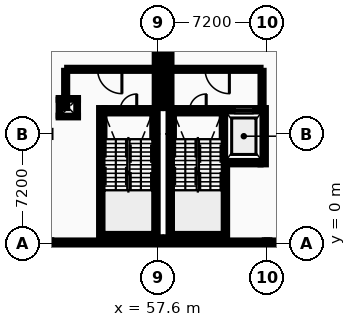
"""IFC4 building model, lengths in metres.
Left out: names, types, materials, properties, quantities, classifications, styles, units other than length and angle.
Written with IfcOpenShell. Run it as: python <this file> out.ifc"""

import sys

from ifc_helpers import new_model, si_unit, direction, frame, frame_2d, origin, origin_2d, place, context, subcontext, project, spatial, rectangle, i_section, extrude, element, fill, save


model = new_model("IFC4")
c1 = context("Model", 3, precision=1e-05, world=origin(), true_north=direction((0.0, 1.0)))
c2 = subcontext(c1, "Body", "Model", "MODEL_VIEW")
j1 = project(units=[si_unit("LENGTHUNIT", "METRE"), si_unit("PLANEANGLEUNIT", "RADIAN")], contexts=[c1])
p1 = place(None, origin())
s1 = spatial("IfcSite", under=j1, at=p1, CompositionType="ELEMENT")
p2 = place(p1, origin())
s2 = spatial("IfcBuilding", under=s1, at=p2, CompositionType="ELEMENT")
p3 = place(p2, frame((0.0, 0.0, 5.2)))
s3 = spatial("IfcBuildingStorey", under=s2, at=p3, CompositionType="ELEMENT", Elevation=5.2)
for number, where, z_axis, x_axis in (
    (1, (57.6, 0.0, 0.0), (0.0, 0.0, 1.0), (1.0, 0.0, 0.0)),
    (2, (58.32, 0.0, 0.0), (0.0, 0.0, 1.0), (1.0, 0.0, 0.0)),
    (3, (64.8, 0.0, 0.0), (0.0, 0.0, 1.0), (1.0, 0.0, 0.0)),
):
    element("IfcColumn", number, at=place(p3, frame(where, z_axis=z_axis, x_axis=x_axis)), inside=s3, PredefinedType="COLUMN", context=c2, shape_type="SweptSolid", body=[
        extrude(i_section(OverallWidth=0.3, OverallDepth=0.4, WebThickness=0.013, FlangeThickness=0.024, FilletRadius=0.027, at=origin_2d()), origin(), (0.0, 0.0, 1.0), 4.4),
    ])
p4 = place(p3, frame((50.29, 0.0, 0.0), z_axis=(0.0, 0.0, 1.0), x_axis=(1.0, 0.0, 0.0)))
e4 = element("IfcWall", 4, at=p4, inside=s3, PredefinedType="STANDARD", context=c2, shape_type="SweptSolid", body=[
    extrude(rectangle(XDim=7.12, YDim=0.38, at=frame_2d((3.56, 0.0))), origin(), (0.0, 0.0, 1.0), 3.88),
])
p5 = place(p4, frame((4.554, 0.0, 0.95)))
e5 = element("IfcOpeningElement", 5, at=p5, cuts=e4, PredefinedType="OPENING", context=c2, shape_type="SweptSolid", body=[
    extrude(rectangle(XDim=0.86, YDim=1.332, at=frame_2d((0.43, 0.666))), frame((0.0, 0.2, 0.0), z_axis=(0.0, -1.0, 0.0), x_axis=(1.0, 0.0, 0.0)), (0.0, 0.0, 1.0), 0.4),
])
p6 = place(p3, frame((57.6, -0.19, 0.0), z_axis=(0.0, 0.0, 1.0), x_axis=(0.0, 1.0, 0.0)))
e6 = element("IfcWall", 6, at=p6, inside=s3, PredefinedType="STANDARD", context=c2, shape_type="SweptSolid", body=[
    extrude(rectangle(XDim=0.59, YDim=0.38, at=frame_2d((0.295, 0.0))), origin(), (0.0, 0.0, 1.0), 4.185),
])
p7 = place(p3, frame((57.6, 8.9, 0.0), z_axis=(0.0, 0.0, 1.0), x_axis=(0.0, 1.0, 0.0)))
e7 = element("IfcWall", 7, at=p7, inside=s3, PredefinedType="STANDARD", context=c2, shape_type="SweptSolid", body=[
    extrude(rectangle(XDim=5.5, YDim=0.38, at=frame_2d((2.75, 0.0))), origin(), (0.0, 0.0, 1.0), 4.185),
])
p8 = place(p3, frame((58.51, 0.0, 0.0), z_axis=(0.0, 0.0, 1.0), x_axis=(1.0, 0.0, 0.0)))
e8 = element("IfcWall", 8, at=p8, inside=s3, PredefinedType="STANDARD", context=c2, shape_type="SweptSolid", body=[
    extrude(rectangle(XDim=6.29, YDim=0.38, at=frame_2d((3.145, 0.0))), origin(), (0.0, 0.0, 1.0), 3.88),
])
p9 = place(p3, frame((64.8, 0.0, 0.0), z_axis=(0.0, 0.0, 1.0), x_axis=(1.0, 0.0, 0.0)))
e9 = element("IfcWall", 9, at=p9, inside=s3, PredefinedType="STANDARD", context=c2, shape_type="SweptSolid", body=[
    extrude(rectangle(XDim=7.2, YDim=0.38, at=frame_2d((3.6, 0.0))), origin(), (0.0, 0.0, 1.0), 3.88),
])
p10 = place(p9, frame((1.611, 0.0, 0.95)))
e10 = element("IfcOpeningElement", 10, at=p10, cuts=e9, PredefinedType="OPENING", context=c2, shape_type="SweptSolid", body=[
    extrude(rectangle(XDim=1.098, YDim=1.26, at=frame_2d((0.549, 0.63))), frame((0.0, 0.2, 0.0), z_axis=(0.0, -1.0, 0.0), x_axis=(1.0, 0.0, 0.0)), (0.0, 0.0, 1.0), 0.4),
])
p11 = place(p9, frame((4.491, 0.0, 0.95)))
e11 = element("IfcOpeningElement", 11, at=p11, cuts=e9, PredefinedType="OPENING", context=c2, shape_type="SweptSolid", body=[
    extrude(rectangle(XDim=1.098, YDim=1.26, at=frame_2d((0.549, 0.63))), frame((0.0, 0.2, 0.0), z_axis=(0.0, -1.0, 0.0), x_axis=(1.0, 0.0, 0.0)), (0.0, 0.0, 1.0), 0.4),
])
p12 = place(p3, frame((58.32, 0.4, 0.0), z_axis=(0.0, 0.0, 1.0), x_axis=(0.0, -1.0, 0.0)))
e12 = element("IfcWall", 12, at=p12, inside=s3, PredefinedType="STANDARD", context=c2, shape_type="SweptSolid", body=[
    extrude(rectangle(XDim=0.59, YDim=0.38, at=frame_2d((0.295, 0.0))), origin(), (0.0, 0.0, 1.0), 4.185),
])
p13 = place(p3, frame((58.32, 14.4, 0.0), z_axis=(0.0, 0.0, 1.0), x_axis=(0.0, -1.0, 0.0)))
e13 = element("IfcWall", 13, at=p13, inside=s3, PredefinedType="STANDARD", context=c2, shape_type="SweptSolid", body=[
    extrude(rectangle(XDim=5.5, YDim=0.38, at=frame_2d((2.75, 0.0))), origin(), (0.0, 0.0, 1.0), 4.185),
])
p14 = place(p3, frame((54.1, 0.575, 0.0), z_axis=(0.0, 0.0, 1.0), x_axis=(1.0, 0.0, 0.0)))
e14 = element("IfcWall", 14, at=p14, inside=s3, PredefinedType="SHEAR", context=c2, shape_type="SweptSolid", body=[
    extrude(rectangle(XDim=3.15, YDim=0.35, at=frame_2d((1.575, 0.0))), origin(), (0.0, 0.0, 1.0), 4.185),
])
p15 = place(p3, frame((54.1, 8.725, 0.0), z_axis=(0.0, 0.0, 1.0), x_axis=(1.0, 0.0, 0.0)))
e15 = element("IfcWall", 15, at=p15, inside=s3, PredefinedType="SHEAR", context=c2, shape_type="SweptSolid", body=[
    extrude(rectangle(XDim=3.15, YDim=0.35, at=frame_2d((1.575, 0.0))), origin(), (0.0, 0.0, 1.0), 4.185),
])
p16 = place(p15, frame((1.025, 0.0, 0.0)))
e16 = element("IfcOpeningElement", 16, at=p16, cuts=e15, PredefinedType="OPENING", context=c2, shape_type="SweptSolid", body=[
    extrude(rectangle(XDim=1.1, YDim=2.15, at=frame_2d((0.55, 1.075))), frame((0.0, 0.185, 0.0), z_axis=(0.0, -1.0, 0.0), x_axis=(1.0, 0.0, 0.0)), (0.0, 0.0, 1.0), 0.37),
])
for number, where, z_axis, x_axis in (
    (17, (53.925, 0.4, 0.0), (0.0, 0.0, 1.0), (0.0, 1.0, 0.0)),
    (18, (57.425, 0.4, 0.0), (0.0, 0.0, 1.0), (0.0, 1.0, 0.0)),
):
    element("IfcWall", number, at=place(p3, frame(where, z_axis=z_axis, x_axis=x_axis)), inside=s3, PredefinedType="SHEAR", context=c2, shape_type="SweptSolid", body=[
        extrude(rectangle(XDim=8.5, YDim=0.35, at=frame_2d((4.25, 0.0))), origin(), (0.0, 0.0, 1.0), 4.185),
    ])
p17 = place(p3, frame((51.65, 11.45, 0.0), z_axis=(0.0, 0.0, 1.0), x_axis=(1.0, 0.0, 0.0)))
e19 = element("IfcWall", 19, at=p17, inside=s3, PredefinedType="PARTITIONING", context=c2, shape_type="SweptSolid", body=[
    extrude(rectangle(XDim=5.6, YDim=0.2, at=frame_2d((2.8, 0.0))), origin(), (0.0, 0.0, 1.0), 4.185),
])
p18 = place(p17, frame((2.0, 0.0, 0.0)))
e20 = element("IfcOpeningElement", 20, at=p18, cuts=e19, PredefinedType="OPENING", context=c2, shape_type="SweptSolid", body=[
    extrude(rectangle(XDim=1.6, YDim=2.2, at=frame_2d((0.8, 1.1))), frame((0.0, 0.11, 0.0), z_axis=(0.0, -1.0, 0.0), x_axis=(1.0, 0.0, 0.0)), (0.0, 0.0, 1.0), 0.22),
])
p19 = place(p3, frame((51.55, 8.9, 0.0), z_axis=(0.0, 0.0, 1.0), x_axis=(0.0, 1.0, 0.0)))
e21 = element("IfcWall", 21, at=p19, inside=s3, PredefinedType="PARTITIONING", context=c2, shape_type="SweptSolid", body=[
    extrude(rectangle(XDim=2.45, YDim=0.2, at=frame_2d((1.225, 0.0))), origin(), (0.0, 0.0, 1.0), 4.185),
])
p20 = place(p3, frame((58.67, 0.575, 0.0), z_axis=(0.0, 0.0, 1.0), x_axis=(1.0, 0.0, 0.0)))
e22 = element("IfcWall", 22, at=p20, inside=s3, PredefinedType="SHEAR", context=c2, shape_type="SweptSolid", body=[
    extrude(rectangle(XDim=3.15, YDim=0.35, at=frame_2d((1.575, 0.0))), origin(), (0.0, 0.0, 1.0), 4.185),
])
p21 = place(p3, frame((58.67, 8.725, 0.0), z_axis=(0.0, 0.0, 1.0), x_axis=(1.0, 0.0, 0.0)))
e23 = element("IfcWall", 23, at=p21, inside=s3, PredefinedType="SHEAR", context=c2, shape_type="SweptSolid", body=[
    extrude(rectangle(XDim=3.15, YDim=0.35, at=frame_2d((1.575, 0.0))), origin(), (0.0, 0.0, 1.0), 4.185),
])
p22 = place(p21, frame((1.025, 0.0, 0.0)))
e24 = element("IfcOpeningElement", 24, at=p22, cuts=e23, PredefinedType="OPENING", context=c2, shape_type="SweptSolid", body=[
    extrude(rectangle(XDim=1.1, YDim=2.15, at=frame_2d((0.55, 1.075))), frame((0.0, 0.185, 0.0), z_axis=(0.0, -1.0, 0.0), x_axis=(1.0, 0.0, 0.0)), (0.0, 0.0, 1.0), 0.37),
])
for number, where, z_axis, x_axis in (
    (25, (58.495, 0.4, 0.0), (0.0, 0.0, 1.0), (0.0, 1.0, 0.0)),
    (26, (61.995, 0.4, 0.0), (0.0, 0.0, 1.0), (0.0, 1.0, 0.0)),
):
    element("IfcWall", number, at=place(p3, frame(where, z_axis=z_axis, x_axis=x_axis)), inside=s3, PredefinedType="SHEAR", context=c2, shape_type="SweptSolid", body=[
        extrude(rectangle(XDim=8.5, YDim=0.35, at=frame_2d((4.25, 0.0))), origin(), (0.0, 0.0, 1.0), 4.185),
    ])
p23 = place(p3, frame((62.17, 5.375, 0.0), z_axis=(0.0, 0.0, 1.0), x_axis=(1.0, 0.0, 0.0)))
e27 = element("IfcWall", 27, at=p23, inside=s3, PredefinedType="SHEAR", context=c2, shape_type="SweptSolid", body=[
    extrude(rectangle(XDim=2.2, YDim=0.35, at=frame_2d((1.1, 0.0))), origin(), (0.0, 0.0, 1.0), 4.185),
])
p24 = place(p3, frame((62.17, 8.725, 0.0), z_axis=(0.0, 0.0, 1.0), x_axis=(1.0, 0.0, 0.0)))
e28 = element("IfcWall", 28, at=p24, inside=s3, PredefinedType="SHEAR", context=c2, shape_type="SweptSolid", body=[
    extrude(rectangle(XDim=2.2, YDim=0.35, at=frame_2d((1.1, 0.0))), origin(), (0.0, 0.0, 1.0), 4.185),
])
p25 = place(p24, frame((0.5, 0.0, 0.0)))
e29 = element("IfcOpeningElement", 29, at=p25, cuts=e28, PredefinedType="OPENING", context=c2, shape_type="SweptSolid", body=[
    extrude(rectangle(XDim=1.2, YDim=2.2, at=frame_2d((0.6, 1.1))), frame((0.0, 0.185, 0.0), z_axis=(0.0, -1.0, 0.0), x_axis=(1.0, 0.0, 0.0)), (0.0, 0.0, 1.0), 0.37),
])
p26 = place(p3, frame((64.545, 5.2, 0.0), z_axis=(0.0, 0.0, 1.0), x_axis=(0.0, 1.0, 0.0)))
e30 = element("IfcWall", 30, at=p26, inside=s3, PredefinedType="SHEAR", context=c2, shape_type="SweptSolid", body=[
    extrude(rectangle(XDim=3.7, YDim=0.35, at=frame_2d((1.85, 0.0))), origin(), (0.0, 0.0, 1.0), 4.185),
])
p27 = place(p3, frame((58.67, 11.45, 0.0), z_axis=(0.0, 0.0, 1.0), x_axis=(1.0, 0.0, 0.0)))
e31 = element("IfcWall", 31, at=p27, inside=s3, PredefinedType="PARTITIONING", context=c2, shape_type="SweptSolid", body=[
    extrude(rectangle(XDim=5.7, YDim=0.2, at=frame_2d((2.85, 0.0))), origin(), (0.0, 0.0, 1.0), 4.185),
])
p28 = place(p27, frame((2.05, 0.0, 0.0)))
e32 = element("IfcOpeningElement", 32, at=p28, cuts=e31, PredefinedType="OPENING", context=c2, shape_type="SweptSolid", body=[
    extrude(rectangle(XDim=1.6, YDim=2.2, at=frame_2d((0.8, 1.1))), frame((0.0, 0.11, 0.0), z_axis=(0.0, -1.0, 0.0), x_axis=(1.0, 0.0, 0.0)), (0.0, 0.0, 1.0), 0.22),
])
p29 = place(p3, frame((64.47, 8.9, 0.0), z_axis=(0.0, 0.0, 1.0), x_axis=(0.0, 1.0, 0.0)))
e33 = element("IfcWall", 33, at=p29, inside=s3, PredefinedType="PARTITIONING", context=c2, shape_type="SweptSolid", body=[
    extrude(rectangle(XDim=2.45, YDim=0.2, at=frame_2d((1.225, 0.0))), origin(), (0.0, 0.0, 1.0), 4.185),
])
for number, where, z_axis, x_axis in (
    (34, (51.09, 8.345, 0.0), (0.0, 0.0, 1.0), (1.0, 0.0, 0.0)),
    (35, (51.09, 9.505, 0.0), (0.0, 0.0, 1.0), (1.0, 0.0, 0.0)),
):
    element("IfcWall", number, at=place(p3, frame(where, z_axis=z_axis, x_axis=x_axis)), inside=s3, PredefinedType="PARTITIONING", context=c2, shape_type="SweptSolid", body=[
        extrude(rectangle(XDim=1.27, YDim=0.11, at=frame_2d((0.635, 0.0))), origin(), (0.0, 0.0, 1.0), 4.185),
    ])
for number, where, z_axis, x_axis in (
    (36, (51.145, 8.4, 0.0), (0.0, 0.0, 1.0), (0.0, 1.0, 0.0)),
    (37, (52.305, 8.4, 0.0), (0.0, 0.0, 1.0), (0.0, 1.0, 0.0)),
):
    element("IfcWall", number, at=place(p3, frame(where, z_axis=z_axis, x_axis=x_axis)), inside=s3, PredefinedType="PARTITIONING", context=c2, shape_type="SweptSolid", body=[
        extrude(rectangle(XDim=1.05, YDim=0.11, at=frame_2d((0.525, 0.0))), origin(), (0.0, 0.0, 1.0), 4.185),
    ])
p30 = place(p5, origin())
e38 = element("IfcWindow", 38, at=p30, inside=s3, PartitioningType="SINGLE_PANEL", PredefinedType="WINDOW", context=c2, shape_type="SweptSolid", body=[
    extrude(rectangle(XDim=0.86, YDim=1.332, at=frame_2d((0.43, 0.666))), frame((0.0, 0.03, 0.0), z_axis=(0.0, -1.0, 0.0), x_axis=(1.0, 0.0, 0.0)), (0.0, 0.0, 1.0), 0.06),
])
fill(e5, e38)
p31 = place(p16, frame((1.1, 0.0, 0.0), z_axis=(0.0, 0.0, 1.0), x_axis=(-1.0, 0.0, 0.0)))
e39 = element("IfcDoor", 39, at=p31, inside=s3, OperationType="SINGLE_SWING_RIGHT", PredefinedType="DOOR", context=c2, shape_type="SweptSolid", body=[
    extrude(rectangle(XDim=1.1, YDim=2.15, at=frame_2d((0.55, 1.075))), frame((0.0, 0.025, 0.0), z_axis=(0.0, -1.0, 0.0), x_axis=(1.0, 0.0, 0.0)), (0.0, 0.0, 1.0), 0.05),
])
fill(e16, e39)
p32 = place(p18, origin())
e40 = element("IfcDoor", 40, at=p32, inside=s3, OperationType="DOUBLE_DOOR_SINGLE_SWING", PredefinedType="DOOR", context=c2, shape_type="SweptSolid", body=[
    extrude(rectangle(XDim=1.6, YDim=2.2, at=frame_2d((0.8, 1.1))), frame((0.0, 0.025, 0.0), z_axis=(0.0, -1.0, 0.0), x_axis=(1.0, 0.0, 0.0)), (0.0, 0.0, 1.0), 0.05),
])
fill(e20, e40)
p33 = place(p22, frame((1.1, 0.0, 0.0), z_axis=(0.0, 0.0, 1.0), x_axis=(-1.0, 0.0, 0.0)))
e41 = element("IfcDoor", 41, at=p33, inside=s3, OperationType="SINGLE_SWING_RIGHT", PredefinedType="DOOR", context=c2, shape_type="SweptSolid", body=[
    extrude(rectangle(XDim=1.1, YDim=2.15, at=frame_2d((0.55, 1.075))), frame((0.0, 0.025, 0.0), z_axis=(0.0, -1.0, 0.0), x_axis=(1.0, 0.0, 0.0)), (0.0, 0.0, 1.0), 0.05),
])
fill(e24, e41)
p34 = place(p25, origin())
e42 = element("IfcDoor", 42, at=p34, inside=s3, OperationType="SLIDING_TO_RIGHT", PredefinedType="DOOR", context=c2, shape_type="SweptSolid", body=[
    extrude(rectangle(XDim=1.2, YDim=2.2, at=frame_2d((0.6, 1.1))), frame((0.0, 0.025, 0.0), z_axis=(0.0, -1.0, 0.0), x_axis=(1.0, 0.0, 0.0)), (0.0, 0.0, 1.0), 0.05),
])
fill(e29, e42)
p35 = place(p28, origin())
e43 = element("IfcDoor", 43, at=p35, inside=s3, OperationType="DOUBLE_DOOR_SINGLE_SWING", PredefinedType="DOOR", context=c2, shape_type="SweptSolid", body=[
    extrude(rectangle(XDim=1.6, YDim=2.2, at=frame_2d((0.8, 1.1))), frame((0.0, 0.025, 0.0), z_axis=(0.0, -1.0, 0.0), x_axis=(1.0, 0.0, 0.0)), (0.0, 0.0, 1.0), 0.05),
])
fill(e32, e43)
save(model, sys.argv[1])
